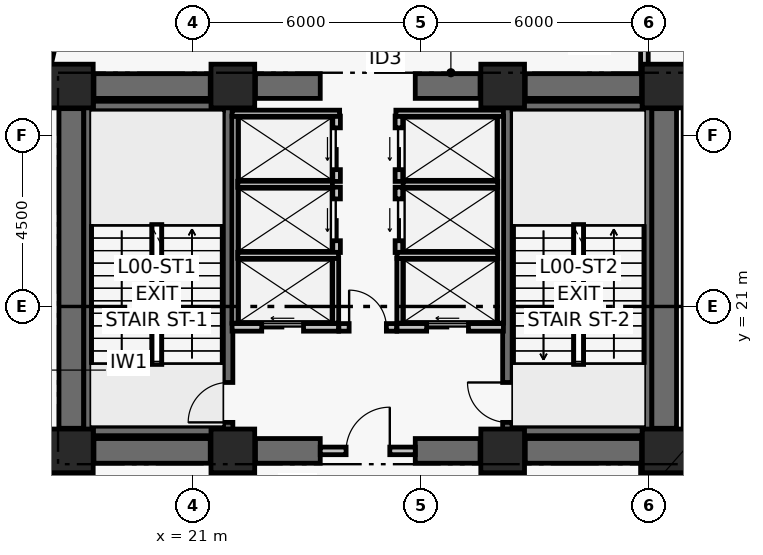
"""IFC4 building model, lengths in metres.
Left out: names, types, materials, properties, quantities, classifications, styles, units other than length and angle.
Written with IfcOpenShell. Run it as: python <this file> out.ifc"""

import sys

from ifc_helpers import new_model, si_unit, direction, frame, frame_2d, origin, origin_2d, place, context, subcontext, project, spatial, rectangle, extrude, element, fill, save


model = new_model("IFC4")
c1 = context("Model", 3, precision=1e-05, world=origin(), true_north=direction((0.0, 1.0)))
c2 = subcontext(c1, "Body", "Model", "MODEL_VIEW")
j1 = project(units=[si_unit("LENGTHUNIT", "METRE"), si_unit("PLANEANGLEUNIT", "RADIAN")], contexts=[c1])
p1 = place(None, origin())
s1 = spatial("IfcSite", under=j1, at=p1, CompositionType="ELEMENT")
p2 = place(p1, origin())
s2 = spatial("IfcBuilding", under=s1, at=p2, CompositionType="ELEMENT")
p3 = place(p2, origin())
s3 = spatial("IfcBuildingStorey", under=s2, at=p3, CompositionType="ELEMENT", Elevation=0.0)
for number, where, z_axis, x_axis in (
    (1, (17.8, 17.2, 0.0), (0.0, 0.0, 1.0), (1.0, 0.0, 0.0)),
    (2, (22.05, 17.2, 0.0), (0.0, 0.0, 1.0), (1.0, 0.0, 0.0)),
    (3, (29.15, 17.2, 0.0), (0.0, 0.0, 1.0), (1.0, 0.0, 0.0)),
    (4, (33.4, 17.2, 0.0), (0.0, 0.0, 1.0), (1.0, 0.0, 0.0)),
    (5, (17.8, 26.8, 0.0), (0.0, 0.0, 1.0), (1.0, 0.0, 0.0)),
    (6, (22.05, 26.8, 0.0), (0.0, 0.0, 1.0), (1.0, 0.0, 0.0)),
    (7, (29.15, 26.8, 0.0), (0.0, 0.0, 1.0), (1.0, 0.0, 0.0)),
    (8, (33.4, 26.8, 0.0), (0.0, 0.0, 1.0), (1.0, 0.0, 0.0)),
):
    element("IfcColumn", number, at=place(p3, frame(where, z_axis=z_axis, x_axis=x_axis)), inside=s3, PredefinedType="COLUMN", context=c2, shape_type="SweptSolid", body=[
        extrude(rectangle(XDim=1.15, YDim=1.15, at=origin_2d()), origin(), (0.0, 0.0, 1.0), 7.2),
    ])
p4 = place(p3, frame((18.395, 17.2, 0.0), z_axis=(0.0, 0.0, 1.0), x_axis=(1.0, 0.0, 0.0)))
e9 = element("IfcWall", 9, at=p4, inside=s3, PredefinedType="SHEAR", context=c2, shape_type="SweptSolid", body=[
    extrude(rectangle(XDim=3.06, YDim=0.65, at=frame_2d((1.53, 0.0))), origin(), (0.0, 0.0, 1.0), 6.88),
])
p5 = place(p3, frame((22.645, 17.2, 0.0), z_axis=(0.0, 0.0, 1.0), x_axis=(1.0, 0.0, 0.0)))
e10 = element("IfcWall", 10, at=p5, inside=s3, PredefinedType="SHEAR", context=c2, shape_type="SweptSolid", body=[
    extrude(rectangle(XDim=1.705, YDim=0.65, at=frame_2d((0.853, 0.0))), origin(), (0.0, 0.0, 1.0), 6.88),
])
p6 = place(p3, frame((26.85, 17.2, 0.0), z_axis=(0.0, 0.0, 1.0), x_axis=(1.0, 0.0, 0.0)))
e11 = element("IfcWall", 11, at=p6, inside=s3, PredefinedType="SHEAR", context=c2, shape_type="SweptSolid", body=[
    extrude(rectangle(XDim=1.705, YDim=0.65, at=frame_2d((0.853, 0.0))), origin(), (0.0, 0.0, 1.0), 6.88),
])
p7 = place(p3, frame((29.745, 17.2, 0.0), z_axis=(0.0, 0.0, 1.0), x_axis=(1.0, 0.0, 0.0)))
e12 = element("IfcWall", 12, at=p7, inside=s3, PredefinedType="SHEAR", context=c2, shape_type="SweptSolid", body=[
    extrude(rectangle(XDim=3.06, YDim=0.65, at=frame_2d((1.53, 0.0))), origin(), (0.0, 0.0, 1.0), 6.88),
])
p8 = place(p3, frame((18.395, 26.8, 0.0), z_axis=(0.0, 0.0, 1.0), x_axis=(1.0, 0.0, 0.0)))
e13 = element("IfcWall", 13, at=p8, inside=s3, PredefinedType="SHEAR", context=c2, shape_type="SweptSolid", body=[
    extrude(rectangle(XDim=3.06, YDim=0.65, at=frame_2d((1.53, 0.0))), origin(), (0.0, 0.0, 1.0), 6.88),
])
p9 = place(p3, frame((22.645, 26.8, 0.0), z_axis=(0.0, 0.0, 1.0), x_axis=(1.0, 0.0, 0.0)))
e14 = element("IfcWall", 14, at=p9, inside=s3, PredefinedType="SHEAR", context=c2, shape_type="SweptSolid", body=[
    extrude(rectangle(XDim=1.705, YDim=0.65, at=frame_2d((0.853, 0.0))), origin(), (0.0, 0.0, 1.0), 6.88),
])
p10 = place(p3, frame((26.85, 26.8, 0.0), z_axis=(0.0, 0.0, 1.0), x_axis=(1.0, 0.0, 0.0)))
e15 = element("IfcWall", 15, at=p10, inside=s3, PredefinedType="SHEAR", context=c2, shape_type="SweptSolid", body=[
    extrude(rectangle(XDim=1.705, YDim=0.65, at=frame_2d((0.853, 0.0))), origin(), (0.0, 0.0, 1.0), 6.88),
])
p11 = place(p3, frame((29.745, 26.8, 0.0), z_axis=(0.0, 0.0, 1.0), x_axis=(1.0, 0.0, 0.0)))
e16 = element("IfcWall", 16, at=p11, inside=s3, PredefinedType="SHEAR", context=c2, shape_type="SweptSolid", body=[
    extrude(rectangle(XDim=3.06, YDim=0.65, at=frame_2d((1.53, 0.0))), origin(), (0.0, 0.0, 1.0), 6.88),
])
for number, where, z_axis, x_axis in (
    (17, (17.8, 17.795, 0.0), (0.0, 0.0, 1.0), (0.0, 1.0, 0.0)),
    (18, (33.4, 17.795, 0.0), (0.0, 0.0, 1.0), (0.0, 1.0, 0.0)),
):
    element("IfcWall", number, at=place(p3, frame(where, z_axis=z_axis, x_axis=x_axis)), inside=s3, PredefinedType="SHEAR", context=c2, shape_type="SweptSolid", body=[
        extrude(rectangle(XDim=8.41, YDim=0.65, at=frame_2d((4.205, 0.0))), origin(), (0.0, 0.0, 1.0), 6.88),
    ])
p12 = place(p3, frame((18.254, 17.6, 0.0), z_axis=(0.0, 0.0, 1.0), x_axis=(0.0, 1.0, 0.0)))
e19 = element("IfcWall", 19, at=p12, inside=s3, PredefinedType="SHEAR", context=c2, shape_type="SweptSolid", body=[
    extrude(rectangle(XDim=8.8, YDim=0.25, at=frame_2d((4.4, 0.0))), origin(), (0.0, 0.0, 1.0), 6.88),
])
p13 = place(p3, frame((21.925, 17.6, 0.0), z_axis=(0.0, 0.0, 1.0), x_axis=(0.0, 1.0, 0.0)))
e20 = element("IfcWall", 20, at=p13, inside=s3, PredefinedType="SHEAR", context=c2, shape_type="SweptSolid", body=[
    extrude(rectangle(XDim=8.8, YDim=0.25, at=frame_2d((4.4, 0.0))), origin(), (0.0, 0.0, 1.0), 6.88),
])
p14 = place(p13, frame((0.35, 0.0, 0.0)))
e21 = element("IfcOpeningElement", 21, at=p14, cuts=e20, PredefinedType="OPENING", context=c2, shape_type="SweptSolid", body=[
    extrude(rectangle(XDim=1.05, YDim=2.08, at=frame_2d((0.525, 1.04))), frame((0.0, 0.135, 0.0), z_axis=(0.0, -1.0, 0.0), x_axis=(1.0, 0.0, 0.0)), (0.0, 0.0, 1.0), 0.27),
])
for number, where, z_axis, x_axis in (
    (22, (18.379, 17.725, 0.0), (0.0, 0.0, 1.0), (1.0, 0.0, 0.0)),
    (23, (18.379, 26.275, 0.0), (0.0, 0.0, 1.0), (1.0, 0.0, 0.0)),
):
    element("IfcWall", number, at=place(p3, frame(where, z_axis=z_axis, x_axis=x_axis)), inside=s3, PredefinedType="SHEAR", context=c2, shape_type="SweptSolid", body=[
        extrude(rectangle(XDim=3.421, YDim=0.25, at=frame_2d((1.71, 0.0))), origin(), (0.0, 0.0, 1.0), 6.88),
    ])
p15 = place(p3, frame((29.275, 17.6, 0.0), z_axis=(0.0, 0.0, 1.0), x_axis=(0.0, 1.0, 0.0)))
e24 = element("IfcWall", 24, at=p15, inside=s3, PredefinedType="SHEAR", context=c2, shape_type="SweptSolid", body=[
    extrude(rectangle(XDim=8.8, YDim=0.25, at=frame_2d((4.4, 0.0))), origin(), (0.0, 0.0, 1.0), 6.88),
])
p16 = place(p15, frame((0.35, 0.0, 0.0)))
e25 = element("IfcOpeningElement", 25, at=p16, cuts=e24, PredefinedType="OPENING", context=c2, shape_type="SweptSolid", body=[
    extrude(rectangle(XDim=1.05, YDim=2.08, at=frame_2d((0.525, 1.04))), frame((0.0, 0.135, 0.0), z_axis=(0.0, -1.0, 0.0), x_axis=(1.0, 0.0, 0.0)), (0.0, 0.0, 1.0), 0.27),
])
p17 = place(p3, frame((32.946, 17.6, 0.0), z_axis=(0.0, 0.0, 1.0), x_axis=(0.0, 1.0, 0.0)))
e26 = element("IfcWall", 26, at=p17, inside=s3, PredefinedType="SHEAR", context=c2, shape_type="SweptSolid", body=[
    extrude(rectangle(XDim=8.8, YDim=0.25, at=frame_2d((4.4, 0.0))), origin(), (0.0, 0.0, 1.0), 6.88),
])
for number, where, z_axis, x_axis in (
    (27, (29.4, 17.725, 0.0), (0.0, 0.0, 1.0), (1.0, 0.0, 0.0)),
    (28, (29.4, 26.275, 0.0), (0.0, 0.0, 1.0), (1.0, 0.0, 0.0)),
):
    element("IfcWall", number, at=place(p3, frame(where, z_axis=z_axis, x_axis=x_axis)), inside=s3, PredefinedType="SHEAR", context=c2, shape_type="SweptSolid", body=[
        extrude(rectangle(XDim=3.421, YDim=0.25, at=frame_2d((1.71, 0.0))), origin(), (0.0, 0.0, 1.0), 6.88),
    ])
p18 = place(p3, frame((24.35, 17.2, 0.0), z_axis=(0.0, 0.0, 1.0), x_axis=(1.0, 0.0, 0.0)))
e29 = element("IfcWall", 29, at=p18, inside=s3, PredefinedType="PARTITIONING", context=c2, shape_type="SweptSolid", body=[
    extrude(rectangle(XDim=2.5, YDim=0.2, at=frame_2d((1.25, 0.0))), origin(), (0.0, 0.0, 1.0), 6.01),
])
p19 = place(p18, frame((0.68, 0.0, 0.0)))
e30 = element("IfcOpeningElement", 30, at=p19, cuts=e29, PredefinedType="OPENING", context=c2, shape_type="SweptSolid", body=[
    extrude(rectangle(XDim=1.15, YDim=2.08, at=frame_2d((0.575, 1.04))), frame((0.0, 0.11, 0.0), z_axis=(0.0, -1.0, 0.0), x_axis=(1.0, 0.0, 0.0)), (0.0, 0.0, 1.0), 0.22),
])
p20 = place(p3, frame((24.84, 20.45, 0.0), z_axis=(0.0, 0.0, 1.0), x_axis=(1.0, 0.0, 0.0)))
e31 = element("IfcWall", 31, at=p20, inside=s3, PredefinedType="PARTITIONING", context=c2, shape_type="SweptSolid", body=[
    extrude(rectangle(XDim=1.52, YDim=0.2, at=frame_2d((0.76, 0.0))), origin(), (0.0, 0.0, 1.0), 6.88),
])
p21 = place(p20, frame((0.27, 0.0, 0.0)))
e32 = element("IfcOpeningElement", 32, at=p21, cuts=e31, PredefinedType="OPENING", context=c2, shape_type="SweptSolid", body=[
    extrude(rectangle(XDim=0.98, YDim=2.06, at=frame_2d((0.49, 1.03))), frame((0.0, 0.11, 0.0), z_axis=(0.0, -1.0, 0.0), x_axis=(1.0, 0.0, 0.0)), (0.0, 0.0, 1.0), 0.22),
])
p22 = place(p3, frame((22.03, 20.45, 0.0), z_axis=(0.0, 0.0, 1.0), x_axis=(1.0, 0.0, 0.0)))
e33 = element("IfcWall", 33, at=p22, inside=s3, PredefinedType="PARTITIONING", context=c2, shape_type="SweptSolid", body=[
    extrude(rectangle(XDim=2.8, YDim=0.2, at=frame_2d((1.4, 0.0))), origin(), (0.0, 0.0, 1.0), 6.88),
])
p23 = place(p22, frame((0.78, 0.0, 0.0)))
e34 = element("IfcOpeningElement", 34, at=p23, cuts=e33, PredefinedType="OPENING", context=c2, shape_type="SweptSolid", body=[
    extrude(rectangle(XDim=1.1, YDim=2.08, at=frame_2d((0.55, 1.04))), frame((0.0, 0.11, 0.0), z_axis=(0.0, -1.0, 0.0), x_axis=(1.0, 0.0, 0.0)), (0.0, 0.0, 1.0), 0.22),
])
p24 = place(p3, frame((26.37, 20.45, 0.0), z_axis=(0.0, 0.0, 1.0), x_axis=(1.0, 0.0, 0.0)))
e35 = element("IfcWall", 35, at=p24, inside=s3, PredefinedType="PARTITIONING", context=c2, shape_type="SweptSolid", body=[
    extrude(rectangle(XDim=2.8, YDim=0.2, at=frame_2d((1.4, 0.0))), origin(), (0.0, 0.0, 1.0), 6.88),
])
p25 = place(p24, frame((0.78, 0.0, 0.0)))
e36 = element("IfcOpeningElement", 36, at=p25, cuts=e35, PredefinedType="OPENING", context=c2, shape_type="SweptSolid", body=[
    extrude(rectangle(XDim=1.1, YDim=2.08, at=frame_2d((0.55, 1.04))), frame((0.0, 0.11, 0.0), z_axis=(0.0, -1.0, 0.0), x_axis=(1.0, 0.0, 0.0)), (0.0, 0.0, 1.0), 0.22),
])
p26 = place(p3, frame((24.78, 22.42, 0.0), z_axis=(0.0, 0.0, 1.0), x_axis=(0.0, 1.0, 0.0)))
e37 = element("IfcWall", 37, at=p26, inside=s3, PredefinedType="PARTITIONING", context=c2, shape_type="SweptSolid", body=[
    extrude(rectangle(XDim=1.72, YDim=0.2, at=frame_2d((0.86, 0.0))), origin(), (0.0, 0.0, 1.0), 6.88),
])
p27 = place(p26, frame((0.31, 0.0, 0.0)))
e38 = element("IfcOpeningElement", 38, at=p27, cuts=e37, PredefinedType="OPENING", context=c2, shape_type="SweptSolid", body=[
    extrude(rectangle(XDim=1.1, YDim=2.08, at=frame_2d((0.55, 1.04))), frame((0.0, 0.11, 0.0), z_axis=(0.0, -1.0, 0.0), x_axis=(1.0, 0.0, 0.0)), (0.0, 0.0, 1.0), 0.22),
])
p28 = place(p3, frame((24.78, 24.29, 0.0), z_axis=(0.0, 0.0, 1.0), x_axis=(0.0, 1.0, 0.0)))
e39 = element("IfcWall", 39, at=p28, inside=s3, PredefinedType="PARTITIONING", context=c2, shape_type="SweptSolid", body=[
    extrude(rectangle(XDim=1.72, YDim=0.2, at=frame_2d((0.86, 0.0))), origin(), (0.0, 0.0, 1.0), 6.88),
])
p29 = place(p28, frame((0.31, 0.0, 0.0)))
e40 = element("IfcOpeningElement", 40, at=p29, cuts=e39, PredefinedType="OPENING", context=c2, shape_type="SweptSolid", body=[
    extrude(rectangle(XDim=1.1, YDim=2.08, at=frame_2d((0.55, 1.04))), frame((0.0, 0.11, 0.0), z_axis=(0.0, -1.0, 0.0), x_axis=(1.0, 0.0, 0.0)), (0.0, 0.0, 1.0), 0.22),
])
p30 = place(p3, frame((26.42, 22.42, 0.0), z_axis=(0.0, 0.0, 1.0), x_axis=(0.0, 1.0, 0.0)))
e41 = element("IfcWall", 41, at=p30, inside=s3, PredefinedType="PARTITIONING", context=c2, shape_type="SweptSolid", body=[
    extrude(rectangle(XDim=1.72, YDim=0.2, at=frame_2d((0.86, 0.0))), origin(), (0.0, 0.0, 1.0), 6.88),
])
p31 = place(p30, frame((0.31, 0.0, 0.0)))
e42 = element("IfcOpeningElement", 42, at=p31, cuts=e41, PredefinedType="OPENING", context=c2, shape_type="SweptSolid", body=[
    extrude(rectangle(XDim=1.1, YDim=2.08, at=frame_2d((0.55, 1.04))), frame((0.0, 0.11, 0.0), z_axis=(0.0, -1.0, 0.0), x_axis=(1.0, 0.0, 0.0)), (0.0, 0.0, 1.0), 0.22),
])
p32 = place(p3, frame((26.42, 24.29, 0.0), z_axis=(0.0, 0.0, 1.0), x_axis=(0.0, 1.0, 0.0)))
e43 = element("IfcWall", 43, at=p32, inside=s3, PredefinedType="PARTITIONING", context=c2, shape_type="SweptSolid", body=[
    extrude(rectangle(XDim=1.72, YDim=0.2, at=frame_2d((0.86, 0.0))), origin(), (0.0, 0.0, 1.0), 6.88),
])
p33 = place(p32, frame((0.31, 0.0, 0.0)))
e44 = element("IfcOpeningElement", 44, at=p33, cuts=e43, PredefinedType="OPENING", context=c2, shape_type="SweptSolid", body=[
    extrude(rectangle(XDim=1.1, YDim=2.08, at=frame_2d((0.55, 1.04))), frame((0.0, 0.11, 0.0), z_axis=(0.0, -1.0, 0.0), x_axis=(1.0, 0.0, 0.0)), (0.0, 0.0, 1.0), 0.22),
])
p34 = place(p3, frame((22.105, 20.56, 0.0), z_axis=(0.0, 0.0, 1.0), x_axis=(0.0, 1.0, 0.0)))
e45 = element("IfcWall", 45, at=p34, inside=s3, PredefinedType="PARTITIONING", context=c2, shape_type="SweptSolid", body=[
    extrude(rectangle(XDim=5.45, YDim=0.16, at=frame_2d((2.725, 0.0))), origin(), (0.0, 0.0, 1.0), 6.88),
])
p35 = place(p3, frame((24.755, 20.56, 0.0), z_axis=(0.0, 0.0, 1.0), x_axis=(0.0, 1.0, 0.0)))
e46 = element("IfcWall", 46, at=p35, inside=s3, PredefinedType="PARTITIONING", context=c2, shape_type="SweptSolid", body=[
    extrude(rectangle(XDim=1.71, YDim=0.16, at=frame_2d((0.855, 0.0))), origin(), (0.0, 0.0, 1.0), 6.88),
])
p36 = place(p3, frame((22.18, 22.345, 0.0), z_axis=(0.0, 0.0, 1.0), x_axis=(1.0, 0.0, 0.0)))
e47 = element("IfcWall", 47, at=p36, inside=s3, PredefinedType="PARTITIONING", context=c2, shape_type="SweptSolid", body=[
    extrude(rectangle(XDim=2.65, YDim=0.16, at=frame_2d((1.325, 0.0))), origin(), (0.0, 0.0, 1.0), 6.88),
])
p37 = place(p3, frame((22.18, 24.215, 0.0), z_axis=(0.0, 0.0, 1.0), x_axis=(1.0, 0.0, 0.0)))
e48 = element("IfcWall", 48, at=p37, inside=s3, PredefinedType="PARTITIONING", context=c2, shape_type="SweptSolid", body=[
    extrude(rectangle(XDim=2.49, YDim=0.16, at=frame_2d((1.245, 0.0))), origin(), (0.0, 0.0, 1.0), 6.88),
])
p38 = place(p3, frame((22.03, 26.085, 0.0), z_axis=(0.0, 0.0, 1.0), x_axis=(1.0, 0.0, 0.0)))
e49 = element("IfcWall", 49, at=p38, inside=s3, PredefinedType="PARTITIONING", context=c2, shape_type="SweptSolid", body=[
    extrude(rectangle(XDim=2.83, YDim=0.16, at=frame_2d((1.415, 0.0))), origin(), (0.0, 0.0, 1.0), 6.88),
])
p39 = place(p3, frame((29.095, 20.56, 0.0), z_axis=(0.0, 0.0, 1.0), x_axis=(0.0, 1.0, 0.0)))
e50 = element("IfcWall", 50, at=p39, inside=s3, PredefinedType="PARTITIONING", context=c2, shape_type="SweptSolid", body=[
    extrude(rectangle(XDim=5.45, YDim=0.16, at=frame_2d((2.725, 0.0))), origin(), (0.0, 0.0, 1.0), 6.88),
])
p40 = place(p3, frame((26.445, 20.56, 0.0), z_axis=(0.0, 0.0, 1.0), x_axis=(0.0, 1.0, 0.0)))
e51 = element("IfcWall", 51, at=p40, inside=s3, PredefinedType="PARTITIONING", context=c2, shape_type="SweptSolid", body=[
    extrude(rectangle(XDim=1.71, YDim=0.16, at=frame_2d((0.855, 0.0))), origin(), (0.0, 0.0, 1.0), 6.88),
])
p41 = place(p3, frame((26.37, 22.345, 0.0), z_axis=(0.0, 0.0, 1.0), x_axis=(1.0, 0.0, 0.0)))
e52 = element("IfcWall", 52, at=p41, inside=s3, PredefinedType="PARTITIONING", context=c2, shape_type="SweptSolid", body=[
    extrude(rectangle(XDim=2.65, YDim=0.16, at=frame_2d((1.325, 0.0))), origin(), (0.0, 0.0, 1.0), 6.88),
])
p42 = place(p3, frame((26.53, 24.215, 0.0), z_axis=(0.0, 0.0, 1.0), x_axis=(1.0, 0.0, 0.0)))
e53 = element("IfcWall", 53, at=p42, inside=s3, PredefinedType="PARTITIONING", context=c2, shape_type="SweptSolid", body=[
    extrude(rectangle(XDim=2.49, YDim=0.16, at=frame_2d((1.245, 0.0))), origin(), (0.0, 0.0, 1.0), 6.88),
])
p43 = place(p3, frame((26.34, 26.085, 0.0), z_axis=(0.0, 0.0, 1.0), x_axis=(1.0, 0.0, 0.0)))
e54 = element("IfcWall", 54, at=p43, inside=s3, PredefinedType="PARTITIONING", context=c2, shape_type="SweptSolid", body=[
    extrude(rectangle(XDim=2.83, YDim=0.16, at=frame_2d((1.415, 0.0))), origin(), (0.0, 0.0, 1.0), 6.88),
])
p44 = place(p3, frame((17.152, 16.71, 0.0), z_axis=(0.0, 0.0, 1.0), x_axis=(0.219508226064, -0.975610649127, 0.0)))
e55 = element("IfcWall", 55, at=p44, inside=s3, PredefinedType="PARTITIONING", context=c2, shape_type="SweptSolid", body=[
    extrude(rectangle(XDim=1.464, YDim=0.2, at=frame_2d((0.732, 0.0))), origin(), (0.0, 0.0, 1.0), 5.46),
])
p45 = place(p3, frame((32.88, 15.3, 0.0), z_axis=(0.0, 0.0, 1.0), x_axis=(0.0, 1.0, 0.0)))
e56 = element("IfcWall", 56, at=p45, inside=s3, PredefinedType="PARTITIONING", context=c2, shape_type="SweptSolid", body=[
    extrude(rectangle(XDim=1.48, YDim=0.2, at=frame_2d((0.74, 0.0))), origin(), (0.0, 0.0, 1.0), 6.01),
])
for number, where, z_axis, x_axis in (
    (57, (32.88, 16.78, 0.0), (0.0, 0.0, 1.0), (1.0, 0.0, 0.0)),
    (58, (33.74, 27.22, 0.0), (0.0, 0.0, 1.0), (-1.0, 0.0, 0.0)),
):
    element("IfcWall", number, at=place(p3, frame(where, z_axis=z_axis, x_axis=x_axis)), inside=s3, PredefinedType="PARTITIONING", context=c2, shape_type="SweptSolid", body=[
        extrude(rectangle(XDim=0.86, YDim=0.2, at=frame_2d((0.43, 0.0))), origin(), (0.0, 0.0, 1.0), 5.46),
    ])
p46 = place(p3, frame((32.88, 27.22, 0.0), z_axis=(0.0, 0.0, 1.0), x_axis=(0.0, 1.0, 0.0)))
e59 = element("IfcWall", 59, at=p46, inside=s3, PredefinedType="PARTITIONING", context=c2, shape_type="SweptSolid", body=[
    extrude(rectangle(XDim=1.48, YDim=0.2, at=frame_2d((0.74, 0.0))), origin(), (0.0, 0.0, 1.0), 6.01),
])
p47 = place(p3, frame((17.474, 28.718, 0.0), z_axis=(0.0, 0.0, 1.0), x_axis=(-0.219508226064, -0.975610649127, 0.0)))
e60 = element("IfcWall", 60, at=p47, inside=s3, PredefinedType="PARTITIONING", context=c2, shape_type="SweptSolid", body=[
    extrude(rectangle(XDim=1.464, YDim=0.2, at=frame_2d((0.732, 0.0))), origin(), (0.0, 0.0, 1.0), 5.46),
])
p48 = place(p14, origin())
e61 = element("IfcDoor", 61, at=p48, inside=s3, OperationType="SINGLE_SWING_LEFT", PredefinedType="DOOR", context=c2, shape_type="SweptSolid", body=[
    extrude(rectangle(XDim=1.05, YDim=2.08, at=frame_2d((0.525, 1.04))), frame((0.0, 0.025, 0.0), z_axis=(0.0, -1.0, 0.0), x_axis=(1.0, 0.0, 0.0)), (0.0, 0.0, 1.0), 0.05),
])
fill(e21, e61)
p49 = place(p16, origin())
e62 = element("IfcDoor", 62, at=p49, inside=s3, OperationType="SINGLE_SWING_RIGHT", PredefinedType="DOOR", context=c2, shape_type="SweptSolid", body=[
    extrude(rectangle(XDim=1.05, YDim=2.08, at=frame_2d((0.525, 1.04))), frame((0.0, 0.025, 0.0), z_axis=(0.0, -1.0, 0.0), x_axis=(1.0, 0.0, 0.0)), (0.0, 0.0, 1.0), 0.05),
])
fill(e25, e62)
p50 = place(p19, origin())
e63 = element("IfcDoor", 63, at=p50, inside=s3, OperationType="SINGLE_SWING_RIGHT", PredefinedType="DOOR", context=c2, shape_type="SweptSolid", body=[
    extrude(rectangle(XDim=1.15, YDim=2.08, at=frame_2d((0.575, 1.04))), frame((0.0, 0.025, 0.0), z_axis=(0.0, -1.0, 0.0), x_axis=(1.0, 0.0, 0.0)), (0.0, 0.0, 1.0), 0.05),
])
fill(e30, e63)
p51 = place(p21, origin())
e64 = element("IfcDoor", 64, at=p51, inside=s3, OperationType="SINGLE_SWING_LEFT", PredefinedType="DOOR", context=c2, shape_type="SweptSolid", body=[
    extrude(rectangle(XDim=0.98, YDim=2.06, at=frame_2d((0.49, 1.03))), frame((0.0, 0.025, 0.0), z_axis=(0.0, -1.0, 0.0), x_axis=(1.0, 0.0, 0.0)), (0.0, 0.0, 1.0), 0.05),
])
fill(e32, e64)
p52 = place(p23, origin())
e65 = element("IfcDoor", 65, at=p52, inside=s3, OperationType="DOUBLE_DOOR_SLIDING", PredefinedType="DOOR", context=c2, shape_type="SweptSolid", body=[
    extrude(rectangle(XDim=1.1, YDim=2.08, at=frame_2d((0.55, 1.04))), frame((0.0, 0.025, 0.0), z_axis=(0.0, -1.0, 0.0), x_axis=(1.0, 0.0, 0.0)), (0.0, 0.0, 1.0), 0.05),
])
fill(e34, e65)
p53 = place(p25, origin())
e66 = element("IfcDoor", 66, at=p53, inside=s3, OperationType="DOUBLE_DOOR_SLIDING", PredefinedType="DOOR", context=c2, shape_type="SweptSolid", body=[
    extrude(rectangle(XDim=1.1, YDim=2.08, at=frame_2d((0.55, 1.04))), frame((0.0, 0.025, 0.0), z_axis=(0.0, -1.0, 0.0), x_axis=(1.0, 0.0, 0.0)), (0.0, 0.0, 1.0), 0.05),
])
fill(e36, e66)
p54 = place(p27, origin())
e67 = element("IfcDoor", 67, at=p54, inside=s3, OperationType="DOUBLE_DOOR_SLIDING", PredefinedType="DOOR", context=c2, shape_type="SweptSolid", body=[
    extrude(rectangle(XDim=1.1, YDim=2.08, at=frame_2d((0.55, 1.04))), frame((0.0, 0.025, 0.0), z_axis=(0.0, -1.0, 0.0), x_axis=(1.0, 0.0, 0.0)), (0.0, 0.0, 1.0), 0.05),
])
fill(e38, e67)
p55 = place(p29, origin())
e68 = element("IfcDoor", 68, at=p55, inside=s3, OperationType="DOUBLE_DOOR_SLIDING", PredefinedType="DOOR", context=c2, shape_type="SweptSolid", body=[
    extrude(rectangle(XDim=1.1, YDim=2.08, at=frame_2d((0.55, 1.04))), frame((0.0, 0.025, 0.0), z_axis=(0.0, -1.0, 0.0), x_axis=(1.0, 0.0, 0.0)), (0.0, 0.0, 1.0), 0.05),
])
fill(e40, e68)
p56 = place(p31, origin())
e69 = element("IfcDoor", 69, at=p56, inside=s3, OperationType="DOUBLE_DOOR_SLIDING", PredefinedType="DOOR", context=c2, shape_type="SweptSolid", body=[
    extrude(rectangle(XDim=1.1, YDim=2.08, at=frame_2d((0.55, 1.04))), frame((0.0, 0.025, 0.0), z_axis=(0.0, -1.0, 0.0), x_axis=(1.0, 0.0, 0.0)), (0.0, 0.0, 1.0), 0.05),
])
fill(e42, e69)
p57 = place(p33, origin())
e70 = element("IfcDoor", 70, at=p57, inside=s3, OperationType="DOUBLE_DOOR_SLIDING", PredefinedType="DOOR", context=c2, shape_type="SweptSolid", body=[
    extrude(rectangle(XDim=1.1, YDim=2.08, at=frame_2d((0.55, 1.04))), frame((0.0, 0.025, 0.0), z_axis=(0.0, -1.0, 0.0), x_axis=(1.0, 0.0, 0.0)), (0.0, 0.0, 1.0), 0.05),
])
fill(e44, e70)
save(model, sys.argv[1])
